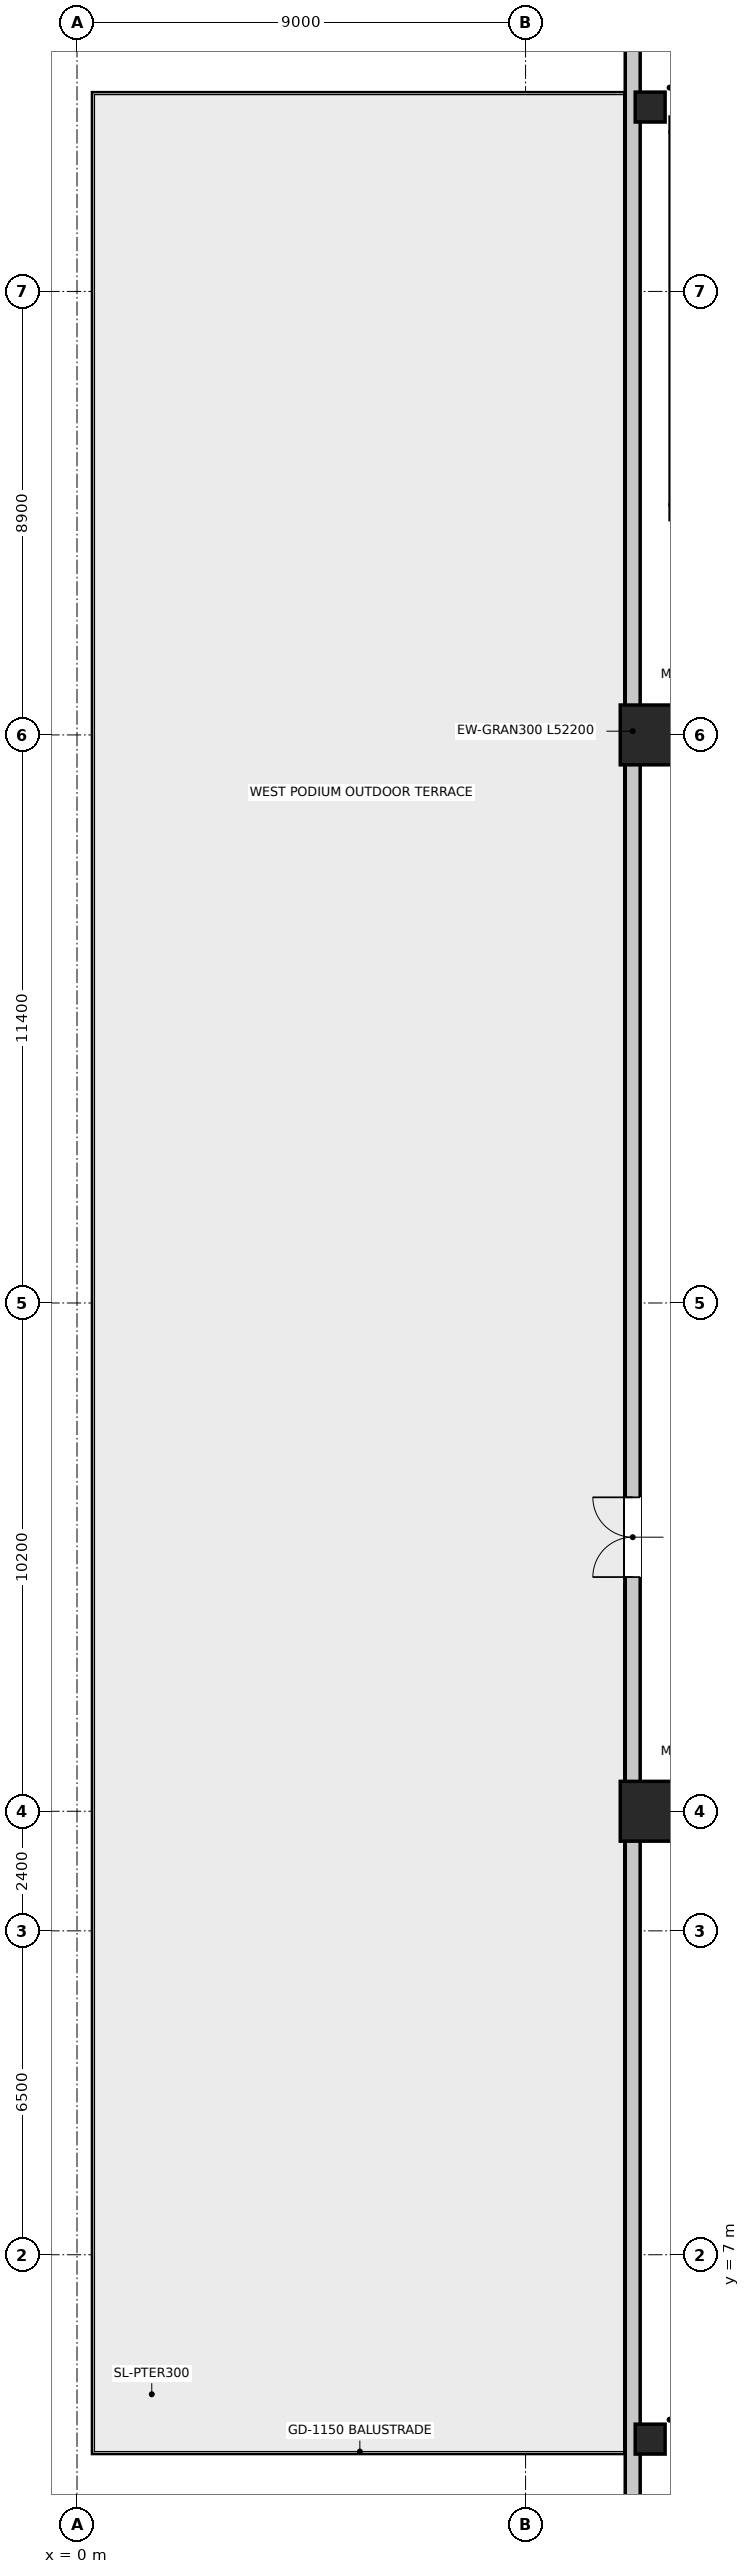
"""IFC4 building model, lengths in metres.
Left out: names, types, materials, properties, quantities, classifications, styles, units other than length and angle.
Written with IfcOpenShell. Run it as: python <this file> out.ifc"""

import sys

from ifc_helpers import new_model, si_unit, direction, frame, frame_2d, origin, origin_2d, place, context, subcontext, project, spatial, rectangle, extrude, source, transform, mapped, element, fill, save


model = new_model("IFC4")
c1 = context("Model", 3, precision=1e-05, world=origin(), true_north=direction((0.0, 1.0)))
c2 = subcontext(c1, "Body", "Model", "MODEL_VIEW")
j1 = project(units=[si_unit("LENGTHUNIT", "METRE"), si_unit("PLANEANGLEUNIT", "RADIAN")], contexts=[c1])
p1 = place(None, origin())
s1 = spatial("IfcSite", under=j1, at=p1, CompositionType="ELEMENT")
p2 = place(p1, origin())
s2 = spatial("IfcBuilding", under=s1, at=p2, CompositionType="ELEMENT")
p3 = place(p2, frame((0.0, 0.0, 15.4)))
s3 = spatial("IfcBuildingStorey", under=s2, at=p3, CompositionType="ELEMENT", Elevation=15.4)
m1 = source(origin(), c2, "Body", "SweptSolid", [
    extrude(rectangle(XDim=1.2, YDim=1.2, at=origin_2d()), origin(), (0.0, 0.0, 1.0), 4.6),
])
for number, where, z_axis, x_axis in (
    (1, (11.5, 15.9, 0.0), (0.0, 0.0, 1.0), (1.0, 0.0, 0.0)),
    (2, (11.5, 37.5, 0.0), (0.0, 0.0, 1.0), (1.0, 0.0, 0.0)),
):
    element("IfcColumn", number, at=place(p3, frame(where, z_axis=z_axis, x_axis=x_axis)), inside=s3, PredefinedType="USERDEFINED", context=c2, shape_type="MappedRepresentation", body=[
        mapped(m1, transform((0.0, 0.0, 0.0), x_axis=(1.0, 0.0, 0.0), y_axis=(0.0, 1.0, 0.0), z_axis=(0.0, 0.0, 1.0), scale=1.0)),
    ])
m2 = source(origin(), c2, "Body", "SweptSolid", [
    extrude(rectangle(XDim=0.6, YDim=0.6, at=origin_2d()), origin(), (0.0, 0.0, 1.0), 4.6),
])
for number, where, z_axis, x_axis in (
    (3, (11.5, 50.1, 0.0), (0.0, 0.0, 1.0), (1.0, 0.0, 0.0)),
    (4, (11.5, 3.3, 0.0), (0.0, 0.0, 1.0), (1.0, 0.0, 0.0)),
):
    element("IfcColumn", number, at=place(p3, frame(where, z_axis=z_axis, x_axis=x_axis)), inside=s3, PredefinedType="COLUMN", context=c2, shape_type="MappedRepresentation", body=[
        mapped(m2, transform((0.0, 0.0, 0.0), x_axis=(1.0, 0.0, 0.0), y_axis=(0.0, 1.0, 0.0), z_axis=(0.0, 0.0, 1.0), scale=1.0)),
    ])
p4 = place(p3, frame((11.15, 0.6, 0.0), z_axis=(0.0, 0.0, 1.0), x_axis=(0.0, 1.0, 0.0)))
e5 = element("IfcWall", 5, at=p4, inside=s3, PredefinedType="SOLIDWALL", context=c2, shape_type="SweptSolid", body=[
    extrude(rectangle(XDim=52.2, YDim=0.3, at=frame_2d((26.1, 0.0))), origin(), (0.0, 0.0, 1.0), 2.45),
])
p5 = place(p4, frame((20.0, 0.0, 0.0)))
e6 = element("IfcOpeningElement", 6, at=p5, cuts=e5, PredefinedType="OPENING", context=c2, shape_type="SweptSolid", body=[
    extrude(rectangle(XDim=1.6, YDim=2.15, at=frame_2d((0.8, 1.075))), frame((0.0, 0.16, 0.0), z_axis=(0.0, -1.0, 0.0), x_axis=(1.0, 0.0, 0.0)), (0.0, 0.0, 1.0), 0.32),
])
p6 = place(p5, origin())
e7 = element("IfcDoor", 7, at=p6, inside=s3, OperationType="DOUBLE_DOOR_SINGLE_SWING", PredefinedType="DOOR", context=c2, shape_type="SweptSolid", body=[
    extrude(rectangle(XDim=1.6, YDim=2.15, at=frame_2d((0.8, 1.075))), frame((0.0, 0.025, 0.0), z_axis=(0.0, -1.0, 0.0), x_axis=(1.0, 0.0, 0.0)), (0.0, 0.0, 1.0), 0.05),
])
fill(e6, e7)
save(model, sys.argv[1])
